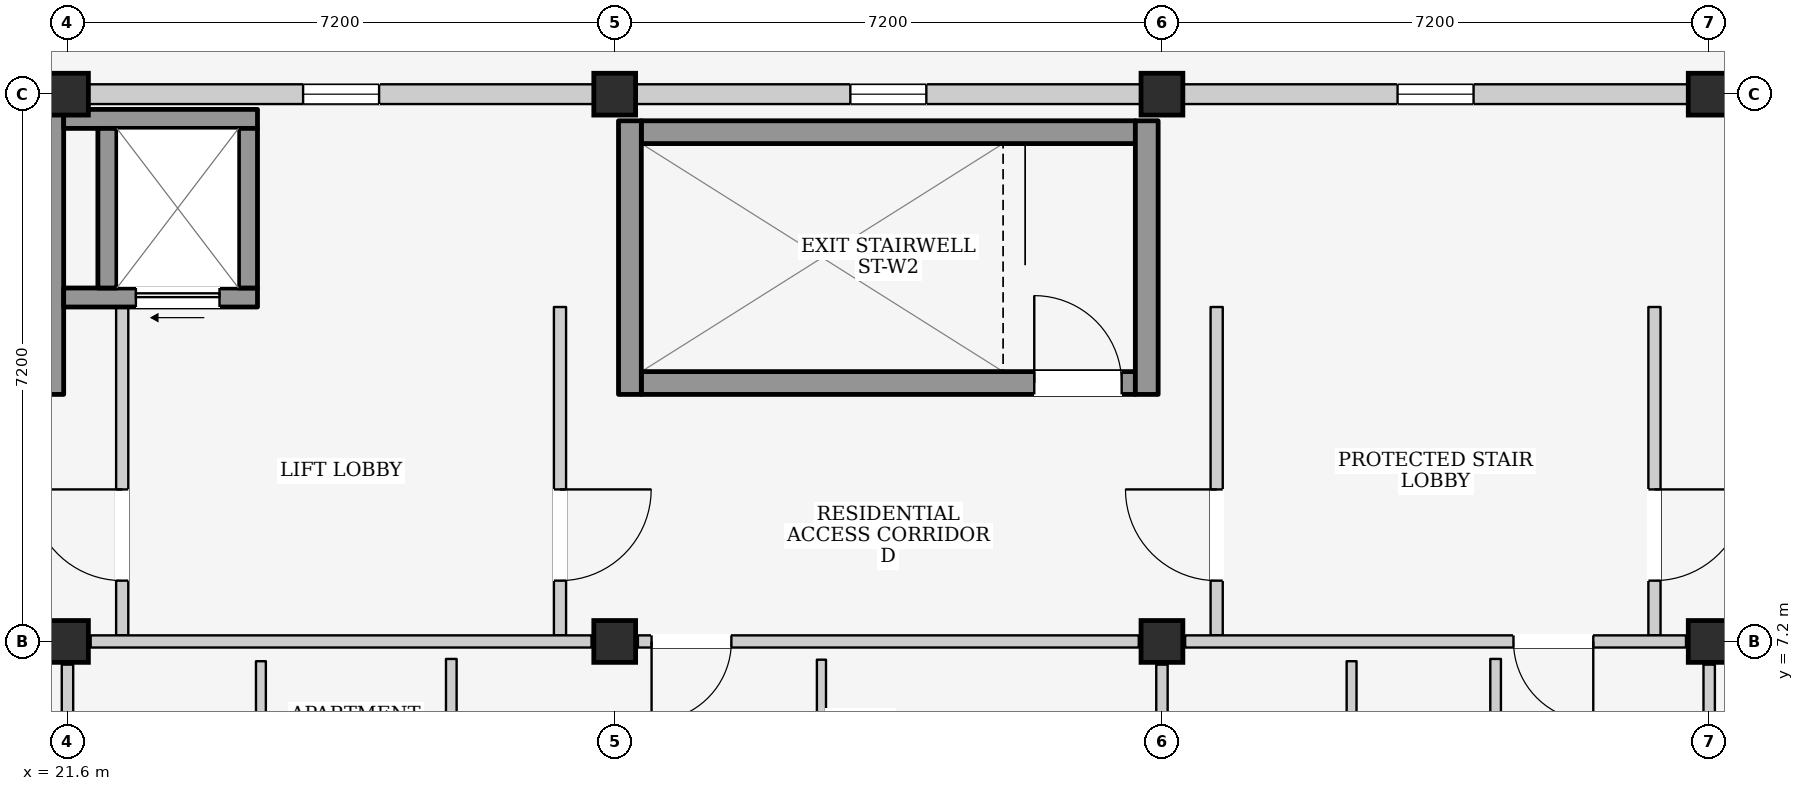
"""IFC4 building model, lengths in metres.
Left out: names, types, materials, properties, quantities, classifications, styles, units other than length and angle.
Written with IfcOpenShell. Run it as: python <this file> out.ifc"""

import sys

from ifc_helpers import new_model, si_unit, direction, frame, frame_2d, origin, origin_2d, place, context, subcontext, project, spatial, rectangle, extrude, element, fill, save


model = new_model("IFC4")
c1 = context("Model", 3, precision=1e-05, world=origin(), true_north=direction((0.0, 1.0)))
c2 = subcontext(c1, "Body", "Model", "MODEL_VIEW")
j1 = project(units=[si_unit("LENGTHUNIT", "METRE"), si_unit("PLANEANGLEUNIT", "RADIAN")], contexts=[c1])
p1 = place(None, origin())
s1 = spatial("IfcSite", under=j1, at=p1, CompositionType="ELEMENT")
p2 = place(p1, origin())
s2 = spatial("IfcBuilding", under=s1, at=p2, CompositionType="ELEMENT")
p3 = place(p2, frame((0.0, 0.0, 28.3)))
s3 = spatial("IfcBuildingStorey", under=s2, at=p3, CompositionType="ELEMENT", Elevation=28.3)
for number, where, z_axis, x_axis in (
    (1, (21.6, 7.2, 0.0), (0.0, 0.0, 1.0), (1.0, 0.0, 0.0)),
    (2, (21.6, 14.4, 0.0), (0.0, 0.0, 1.0), (1.0, 0.0, 0.0)),
    (3, (28.8, 7.2, 0.0), (0.0, 0.0, 1.0), (1.0, 0.0, 0.0)),
    (4, (28.8, 14.4, 0.0), (0.0, 0.0, 1.0), (1.0, 0.0, 0.0)),
    (5, (36.0, 7.2, 0.0), (0.0, 0.0, 1.0), (1.0, 0.0, 0.0)),
    (6, (36.0, 14.4, 0.0), (0.0, 0.0, 1.0), (1.0, 0.0, 0.0)),
    (7, (43.2, 7.2, 0.0), (0.0, 0.0, 1.0), (1.0, 0.0, 0.0)),
    (8, (43.2, 14.4, 0.0), (0.0, 0.0, 1.0), (1.0, 0.0, 0.0)),
):
    element("IfcColumn", number, at=place(p3, frame(where, z_axis=z_axis, x_axis=x_axis)), inside=s3, PredefinedType="COLUMN", context=c2, shape_type="SweptSolid", body=[
        extrude(rectangle(XDim=0.55, YDim=0.55, at=origin_2d()), origin(), (0.0, 0.0, 1.0), 3.2),
    ])
p4 = place(p3, frame((21.875, 14.4, 0.0), z_axis=(0.0, 0.0, 1.0), x_axis=(1.0, 0.0, 0.0)))
e9 = element("IfcWall", 9, at=p4, inside=s3, PredefinedType="ELEMENTEDWALL", context=c2, shape_type="SweptSolid", body=[
    extrude(rectangle(XDim=6.65, YDim=0.26, at=frame_2d((3.325, 0.0))), origin(), (0.0, 0.0, 1.0), 2.345),
])
p5 = place(p4, frame((2.825, 0.0, 1.2)))
e10 = element("IfcOpeningElement", 10, at=p5, cuts=e9, PredefinedType="OPENING", context=c2, shape_type="SweptSolid", body=[
    extrude(rectangle(XDim=1.0, YDim=0.9, at=frame_2d((0.5, 0.45))), frame((0.0, 0.145, 0.0), z_axis=(0.0, -1.0, 0.0), x_axis=(1.0, 0.0, 0.0)), (0.0, 0.0, 1.0), 0.29),
])
p6 = place(p3, frame((29.075, 14.4, 0.0), z_axis=(0.0, 0.0, 1.0), x_axis=(1.0, 0.0, 0.0)))
e11 = element("IfcWall", 11, at=p6, inside=s3, PredefinedType="ELEMENTEDWALL", context=c2, shape_type="SweptSolid", body=[
    extrude(rectangle(XDim=6.65, YDim=0.26, at=frame_2d((3.325, 0.0))), origin(), (0.0, 0.0, 1.0), 2.345),
])
p7 = place(p6, frame((2.825, 0.0, 1.2)))
e12 = element("IfcOpeningElement", 12, at=p7, cuts=e11, PredefinedType="OPENING", context=c2, shape_type="SweptSolid", body=[
    extrude(rectangle(XDim=1.0, YDim=0.9, at=frame_2d((0.5, 0.45))), frame((0.0, 0.145, 0.0), z_axis=(0.0, -1.0, 0.0), x_axis=(1.0, 0.0, 0.0)), (0.0, 0.0, 1.0), 0.29),
])
p8 = place(p3, frame((36.275, 14.4, 0.0), z_axis=(0.0, 0.0, 1.0), x_axis=(1.0, 0.0, 0.0)))
e13 = element("IfcWall", 13, at=p8, inside=s3, PredefinedType="ELEMENTEDWALL", context=c2, shape_type="SweptSolid", body=[
    extrude(rectangle(XDim=6.65, YDim=0.26, at=frame_2d((3.325, 0.0))), origin(), (0.0, 0.0, 1.0), 2.345),
])
p9 = place(p8, frame((2.825, 0.0, 1.2)))
e14 = element("IfcOpeningElement", 14, at=p9, cuts=e13, PredefinedType="OPENING", context=c2, shape_type="SweptSolid", body=[
    extrude(rectangle(XDim=1.0, YDim=0.9, at=frame_2d((0.5, 0.45))), frame((0.0, 0.145, 0.0), z_axis=(0.0, -1.0, 0.0), x_axis=(1.0, 0.0, 0.0)), (0.0, 0.0, 1.0), 0.29),
])
p10 = place(p3, frame((21.4, 10.45, 0.0), z_axis=(0.0, 0.0, 1.0), x_axis=(0.0, 1.0, 0.0)))
e15 = element("IfcWall", 15, at=p10, inside=s3, PredefinedType="SHEAR", context=c2, shape_type="SweptSolid", body=[
    extrude(rectangle(XDim=3.75, YDim=0.3, at=frame_2d((1.875, 0.0))), origin(), (0.0, 0.0, 1.0), 2.95),
])
p11 = place(p3, frame((22.32, 7.28, 0.0), z_axis=(0.0, 0.0, 1.0), x_axis=(0.0, 1.0, 0.0)))
e16 = element("IfcWall", 16, at=p11, inside=s3, PredefinedType="PARTITIONING", context=c2, shape_type="SweptSolid", body=[
    extrude(rectangle(XDim=4.32, YDim=0.16, at=frame_2d((2.16, 0.0))), origin(), (0.0, 0.0, 1.0), 2.95),
])
p12 = place(p11, frame((0.72, 0.0, 0.0)))
e17 = element("IfcOpeningElement", 17, at=p12, cuts=e16, PredefinedType="OPENING", context=c2, shape_type="SweptSolid", body=[
    extrude(rectangle(XDim=1.2, YDim=2.2, at=frame_2d((0.6, 1.1))), frame((0.0, 0.095, 0.0), z_axis=(0.0, -1.0, 0.0), x_axis=(1.0, 0.0, 0.0)), (0.0, 0.0, 1.0), 0.19),
])
p13 = place(p3, frame((28.08, 7.28, 0.0), z_axis=(0.0, 0.0, 1.0), x_axis=(0.0, 1.0, 0.0)))
e18 = element("IfcWall", 18, at=p13, inside=s3, PredefinedType="PARTITIONING", context=c2, shape_type="SweptSolid", body=[
    extrude(rectangle(XDim=4.32, YDim=0.16, at=frame_2d((2.16, 0.0))), origin(), (0.0, 0.0, 1.0), 2.95),
])
p14 = place(p13, frame((0.72, 0.0, 0.0)))
e19 = element("IfcOpeningElement", 19, at=p14, cuts=e18, PredefinedType="OPENING", context=c2, shape_type="SweptSolid", body=[
    extrude(rectangle(XDim=1.2, YDim=2.2, at=frame_2d((0.6, 1.1))), frame((0.0, 0.095, 0.0), z_axis=(0.0, -1.0, 0.0), x_axis=(1.0, 0.0, 0.0)), (0.0, 0.0, 1.0), 0.19),
])
p15 = place(p3, frame((21.55, 11.725, 0.0), z_axis=(0.0, 0.0, 1.0), x_axis=(1.0, 0.0, 0.0)))
e20 = element("IfcWall", 20, at=p15, inside=s3, PredefinedType="SHEAR", context=c2, shape_type="SweptSolid", body=[
    extrude(rectangle(XDim=2.55, YDim=0.25, at=frame_2d((1.275, 0.0))), origin(), (0.0, 0.0, 1.0), 2.95),
])
p16 = place(p15, frame((0.95, 0.0, 0.0)))
e21 = element("IfcOpeningElement", 21, at=p16, cuts=e20, PredefinedType="OPENING", context=c2, shape_type="SweptSolid", body=[
    extrude(rectangle(XDim=1.1, YDim=2.15, at=frame_2d((0.55, 1.075))), frame((0.0, 0.14, 0.0), z_axis=(0.0, -1.0, 0.0), x_axis=(1.0, 0.0, 0.0)), (0.0, 0.0, 1.0), 0.28),
])
p17 = place(p3, frame((21.55, 14.075, 0.0), z_axis=(0.0, 0.0, 1.0), x_axis=(1.0, 0.0, 0.0)))
e22 = element("IfcWall", 22, at=p17, inside=s3, PredefinedType="SHEAR", context=c2, shape_type="SweptSolid", body=[
    extrude(rectangle(XDim=2.55, YDim=0.25, at=frame_2d((1.275, 0.0))), origin(), (0.0, 0.0, 1.0), 2.95),
])
for number, where, z_axis, x_axis in (
    (23, (22.125, 11.85, 0.0), (0.0, 0.0, 1.0), (0.0, 1.0, 0.0)),
    (24, (23.975, 11.85, 0.0), (0.0, 0.0, 1.0), (0.0, 1.0, 0.0)),
):
    element("IfcWall", number, at=place(p3, frame(where, z_axis=z_axis, x_axis=x_axis)), inside=s3, PredefinedType="SHEAR", context=c2, shape_type="SweptSolid", body=[
        extrude(rectangle(XDim=2.1, YDim=0.25, at=frame_2d((1.05, 0.0))), origin(), (0.0, 0.0, 1.0), 2.95),
    ])
p18 = place(p3, frame((29.15, 10.6, 0.0), z_axis=(0.0, 0.0, 1.0), x_axis=(1.0, 0.0, 0.0)))
e25 = element("IfcWall", 25, at=p18, inside=s3, PredefinedType="SHEAR", context=c2, shape_type="SweptSolid", body=[
    extrude(rectangle(XDim=6.5, YDim=0.3, at=frame_2d((3.25, 0.0))), origin(), (0.0, 0.0, 1.0), 2.95),
])
p19 = place(p18, frame((5.17, 0.0, 0.0)))
e26 = element("IfcOpeningElement", 26, at=p19, cuts=e25, PredefinedType="OPENING", context=c2, shape_type="SweptSolid", body=[
    extrude(rectangle(XDim=1.15, YDim=2.2, at=frame_2d((0.575, 1.1))), frame((0.0, 0.165, 0.0), z_axis=(0.0, -1.0, 0.0), x_axis=(1.0, 0.0, 0.0)), (0.0, 0.0, 1.0), 0.33),
])
p20 = place(p3, frame((29.15, 13.9, 0.0), z_axis=(0.0, 0.0, 1.0), x_axis=(1.0, 0.0, 0.0)))
e27 = element("IfcWall", 27, at=p20, inside=s3, PredefinedType="SHEAR", context=c2, shape_type="SweptSolid", body=[
    extrude(rectangle(XDim=6.5, YDim=0.3, at=frame_2d((3.25, 0.0))), origin(), (0.0, 0.0, 1.0), 2.95),
])
for number, where, z_axis, x_axis in (
    (28, (29.0, 10.45, 0.0), (0.0, 0.0, 1.0), (0.0, 1.0, 0.0)),
    (29, (35.8, 10.45, 0.0), (0.0, 0.0, 1.0), (0.0, 1.0, 0.0)),
):
    element("IfcWall", number, at=place(p3, frame(where, z_axis=z_axis, x_axis=x_axis)), inside=s3, PredefinedType="SHEAR", context=c2, shape_type="SweptSolid", body=[
        extrude(rectangle(XDim=3.6, YDim=0.3, at=frame_2d((1.8, 0.0))), origin(), (0.0, 0.0, 1.0), 2.95),
    ])
p21 = place(p3, frame((36.72, 7.28, 0.0), z_axis=(0.0, 0.0, 1.0), x_axis=(0.0, 1.0, 0.0)))
e30 = element("IfcWall", 30, at=p21, inside=s3, PredefinedType="PARTITIONING", context=c2, shape_type="SweptSolid", body=[
    extrude(rectangle(XDim=4.32, YDim=0.16, at=frame_2d((2.16, 0.0))), origin(), (0.0, 0.0, 1.0), 2.95),
])
p22 = place(p21, frame((0.72, 0.0, 0.0)))
e31 = element("IfcOpeningElement", 31, at=p22, cuts=e30, PredefinedType="OPENING", context=c2, shape_type="SweptSolid", body=[
    extrude(rectangle(XDim=1.2, YDim=2.2, at=frame_2d((0.6, 1.1))), frame((0.0, 0.095, 0.0), z_axis=(0.0, -1.0, 0.0), x_axis=(1.0, 0.0, 0.0)), (0.0, 0.0, 1.0), 0.19),
])
p23 = place(p3, frame((42.48, 7.28, 0.0), z_axis=(0.0, 0.0, 1.0), x_axis=(0.0, 1.0, 0.0)))
e32 = element("IfcWall", 32, at=p23, inside=s3, PredefinedType="PARTITIONING", context=c2, shape_type="SweptSolid", body=[
    extrude(rectangle(XDim=4.32, YDim=0.16, at=frame_2d((2.16, 0.0))), origin(), (0.0, 0.0, 1.0), 2.95),
])
p24 = place(p23, frame((0.72, 0.0, 0.0)))
e33 = element("IfcOpeningElement", 33, at=p24, cuts=e32, PredefinedType="OPENING", context=c2, shape_type="SweptSolid", body=[
    extrude(rectangle(XDim=1.2, YDim=2.2, at=frame_2d((0.6, 1.1))), frame((0.0, 0.095, 0.0), z_axis=(0.0, -1.0, 0.0), x_axis=(1.0, 0.0, 0.0)), (0.0, 0.0, 1.0), 0.19),
])
p25 = place(p3, frame((21.6, 0.305, 0.0), z_axis=(0.0, 0.0, 1.0), x_axis=(0.0, 1.0, 0.0)))
e34 = element("IfcWall", 34, at=p25, inside=s3, PredefinedType="PARTITIONING", context=c2, shape_type="SweptSolid", body=[
    extrude(rectangle(XDim=6.59, YDim=0.15, at=frame_2d((3.295, 0.0))), origin(), (0.0, 0.0, 1.0), 2.445),
])
p26 = place(p3, frame((21.905, 7.2, 0.0), z_axis=(0.0, 0.0, 1.0), x_axis=(1.0, 0.0, 0.0)))
e35 = element("IfcWall", 35, at=p26, inside=s3, PredefinedType="PARTITIONING", context=c2, shape_type="SweptSolid", body=[
    extrude(rectangle(XDim=6.59, YDim=0.16, at=frame_2d((3.295, 0.0))), origin(), (0.0, 0.0, 1.0), 2.345),
])
p27 = place(p3, frame((29.105, 7.2, 0.0), z_axis=(0.0, 0.0, 1.0), x_axis=(1.0, 0.0, 0.0)))
e36 = element("IfcWall", 36, at=p27, inside=s3, PredefinedType="PARTITIONING", context=c2, shape_type="SweptSolid", body=[
    extrude(rectangle(XDim=6.59, YDim=0.16, at=frame_2d((3.295, 0.0))), origin(), (0.0, 0.0, 1.0), 2.345),
])
p28 = place(p27, frame((0.18, 0.0, 0.0)))
e37 = element("IfcOpeningElement", 37, at=p28, cuts=e36, PredefinedType="OPENING", context=c2, shape_type="SweptSolid", body=[
    extrude(rectangle(XDim=1.05, YDim=2.15, at=frame_2d((0.525, 1.075))), frame((0.0, 0.095, 0.0), z_axis=(0.0, -1.0, 0.0), x_axis=(1.0, 0.0, 0.0)), (0.0, 0.0, 1.0), 0.19),
])
p29 = place(p3, frame((36.0, 0.305, 0.0), z_axis=(0.0, 0.0, 1.0), x_axis=(0.0, 1.0, 0.0)))
e38 = element("IfcWall", 38, at=p29, inside=s3, PredefinedType="PARTITIONING", context=c2, shape_type="SweptSolid", body=[
    extrude(rectangle(XDim=6.59, YDim=0.15, at=frame_2d((3.295, 0.0))), origin(), (0.0, 0.0, 1.0), 2.445),
])
p30 = place(p3, frame((24.145, 3.9, 0.0), z_axis=(0.0, 0.0, 1.0), x_axis=(0.0, 1.0, 0.0)))
e39 = element("IfcWall", 39, at=p30, inside=s3, PredefinedType="PARTITIONING", context=c2, shape_type="SweptSolid", body=[
    extrude(rectangle(XDim=3.04, YDim=0.13, at=frame_2d((1.52, 0.0))), origin(), (0.0, 0.0, 1.0), 2.95),
])
p31 = place(p3, frame((26.65, 3.91, 0.0), z_axis=(0.0, 0.0, 1.0), x_axis=(0.0, 1.0, 0.0)))
e40 = element("IfcWall", 40, at=p31, inside=s3, PredefinedType="PARTITIONING", context=c2, shape_type="SweptSolid", body=[
    extrude(rectangle(XDim=3.06, YDim=0.14, at=frame_2d((1.53, 0.0))), origin(), (0.0, 0.0, 1.0), 2.95),
])
p32 = place(p3, frame((31.52, 3.92, 0.0), z_axis=(0.0, 0.0, 1.0), x_axis=(0.0, 1.0, 0.0)))
e41 = element("IfcWall", 41, at=p32, inside=s3, PredefinedType="PARTITIONING", context=c2, shape_type="SweptSolid", body=[
    extrude(rectangle(XDim=3.04, YDim=0.12, at=frame_2d((1.52, 0.0))), origin(), (0.0, 0.0, 1.0), 2.95),
])
p33 = place(p32, frame((1.04, 0.0, 0.0)))
e42 = element("IfcOpeningElement", 42, at=p33, cuts=e41, PredefinedType="OPENING", context=c2, shape_type="SweptSolid", body=[
    extrude(rectangle(XDim=0.96, YDim=2.15, at=frame_2d((0.48, 1.075))), frame((0.0, 0.075, 0.0), z_axis=(0.0, -1.0, 0.0), x_axis=(1.0, 0.0, 0.0)), (0.0, 0.0, 1.0), 0.15),
])
p34 = place(p3, frame((36.305, 7.2, 0.0), z_axis=(0.0, 0.0, 1.0), x_axis=(1.0, 0.0, 0.0)))
e43 = element("IfcWall", 43, at=p34, inside=s3, PredefinedType="PARTITIONING", context=c2, shape_type="SweptSolid", body=[
    extrude(rectangle(XDim=6.59, YDim=0.16, at=frame_2d((3.295, 0.0))), origin(), (0.0, 0.0, 1.0), 2.345),
])
p35 = place(p34, frame((4.32, 0.0, 0.0)))
e44 = element("IfcOpeningElement", 44, at=p35, cuts=e43, PredefinedType="OPENING", context=c2, shape_type="SweptSolid", body=[
    extrude(rectangle(XDim=1.05, YDim=2.15, at=frame_2d((0.525, 1.075))), frame((0.0, 0.095, 0.0), z_axis=(0.0, -1.0, 0.0), x_axis=(1.0, 0.0, 0.0)), (0.0, 0.0, 1.0), 0.19),
])
p36 = place(p3, frame((43.2, 0.305, 0.0), z_axis=(0.0, 0.0, 1.0), x_axis=(0.0, 1.0, 0.0)))
e45 = element("IfcWall", 45, at=p36, inside=s3, PredefinedType="PARTITIONING", context=c2, shape_type="SweptSolid", body=[
    extrude(rectangle(XDim=6.59, YDim=0.15, at=frame_2d((3.295, 0.0))), origin(), (0.0, 0.0, 1.0), 2.445),
])
p37 = place(p3, frame((38.495, 4.61, 0.0), z_axis=(0.0, 0.0, 1.0), x_axis=(0.0, 1.0, 0.0)))
e46 = element("IfcWall", 46, at=p37, inside=s3, PredefinedType="PARTITIONING", context=c2, shape_type="SweptSolid", body=[
    extrude(rectangle(XDim=2.33, YDim=0.13, at=frame_2d((1.165, 0.0))), origin(), (0.0, 0.0, 1.0), 2.95),
])
p38 = place(p3, frame((40.39, 4.62, 0.0), z_axis=(0.0, 0.0, 1.0), x_axis=(0.0, 1.0, 0.0)))
e47 = element("IfcWall", 47, at=p38, inside=s3, PredefinedType="PARTITIONING", context=c2, shape_type="SweptSolid", body=[
    extrude(rectangle(XDim=2.35, YDim=0.14, at=frame_2d((1.175, 0.0))), origin(), (0.0, 0.0, 1.0), 2.95),
])
p39 = place(p5, origin())
e48 = element("IfcWindow", 48, at=p39, inside=s3, PartitioningType="SINGLE_PANEL", PredefinedType="WINDOW", context=c2, shape_type="SweptSolid", body=[
    extrude(rectangle(XDim=1.0, YDim=0.9, at=frame_2d((0.5, 0.45))), frame((0.0, 0.03, 0.0), z_axis=(0.0, -1.0, 0.0), x_axis=(1.0, 0.0, 0.0)), (0.0, 0.0, 1.0), 0.06),
])
fill(e10, e48)
p40 = place(p7, origin())
e49 = element("IfcWindow", 49, at=p40, inside=s3, PartitioningType="SINGLE_PANEL", PredefinedType="WINDOW", context=c2, shape_type="SweptSolid", body=[
    extrude(rectangle(XDim=1.0, YDim=0.9, at=frame_2d((0.5, 0.45))), frame((0.0, 0.03, 0.0), z_axis=(0.0, -1.0, 0.0), x_axis=(1.0, 0.0, 0.0)), (0.0, 0.0, 1.0), 0.06),
])
fill(e12, e49)
p41 = place(p9, origin())
e50 = element("IfcWindow", 50, at=p41, inside=s3, PartitioningType="SINGLE_PANEL", PredefinedType="WINDOW", context=c2, shape_type="SweptSolid", body=[
    extrude(rectangle(XDim=1.0, YDim=0.9, at=frame_2d((0.5, 0.45))), frame((0.0, 0.03, 0.0), z_axis=(0.0, -1.0, 0.0), x_axis=(1.0, 0.0, 0.0)), (0.0, 0.0, 1.0), 0.06),
])
fill(e14, e50)
p42 = place(p12, origin())
e51 = element("IfcDoor", 51, at=p42, inside=s3, OperationType="SINGLE_SWING_RIGHT", PredefinedType="DOOR", context=c2, shape_type="SweptSolid", body=[
    extrude(rectangle(XDim=1.2, YDim=2.2, at=frame_2d((0.6, 1.1))), frame((0.0, 0.025, 0.0), z_axis=(0.0, -1.0, 0.0), x_axis=(1.0, 0.0, 0.0)), (0.0, 0.0, 1.0), 0.05),
])
fill(e17, e51)
p43 = place(p14, frame((1.2, 0.0, 0.0), z_axis=(0.0, 0.0, 1.0), x_axis=(-1.0, 0.0, 0.0)))
e52 = element("IfcDoor", 52, at=p43, inside=s3, OperationType="SINGLE_SWING_LEFT", PredefinedType="DOOR", context=c2, shape_type="SweptSolid", body=[
    extrude(rectangle(XDim=1.2, YDim=2.2, at=frame_2d((0.6, 1.1))), frame((0.0, 0.025, 0.0), z_axis=(0.0, -1.0, 0.0), x_axis=(1.0, 0.0, 0.0)), (0.0, 0.0, 1.0), 0.05),
])
fill(e19, e52)
p44 = place(p16, frame((1.1, 0.0, 0.0), z_axis=(0.0, 0.0, 1.0), x_axis=(-1.0, 0.0, 0.0)))
e53 = element("IfcDoor", 53, at=p44, inside=s3, OperationType="SLIDING_TO_LEFT", PredefinedType="DOOR", context=c2, shape_type="SweptSolid", body=[
    extrude(rectangle(XDim=1.1, YDim=2.15, at=frame_2d((0.55, 1.075))), frame((0.0, 0.025, 0.0), z_axis=(0.0, -1.0, 0.0), x_axis=(1.0, 0.0, 0.0)), (0.0, 0.0, 1.0), 0.05),
])
fill(e21, e53)
p45 = place(p19, origin())
e54 = element("IfcDoor", 54, at=p45, inside=s3, OperationType="SINGLE_SWING_LEFT", PredefinedType="DOOR", context=c2, shape_type="SweptSolid", body=[
    extrude(rectangle(XDim=1.15, YDim=2.2, at=frame_2d((0.575, 1.1))), frame((0.0, 0.025, 0.0), z_axis=(0.0, -1.0, 0.0), x_axis=(1.0, 0.0, 0.0)), (0.0, 0.0, 1.0), 0.05),
])
fill(e26, e54)
p46 = place(p22, origin())
e55 = element("IfcDoor", 55, at=p46, inside=s3, OperationType="SINGLE_SWING_RIGHT", PredefinedType="DOOR", context=c2, shape_type="SweptSolid", body=[
    extrude(rectangle(XDim=1.2, YDim=2.2, at=frame_2d((0.6, 1.1))), frame((0.0, 0.025, 0.0), z_axis=(0.0, -1.0, 0.0), x_axis=(1.0, 0.0, 0.0)), (0.0, 0.0, 1.0), 0.05),
])
fill(e31, e55)
p47 = place(p24, frame((1.2, 0.0, 0.0), z_axis=(0.0, 0.0, 1.0), x_axis=(-1.0, 0.0, 0.0)))
e56 = element("IfcDoor", 56, at=p47, inside=s3, OperationType="SINGLE_SWING_LEFT", PredefinedType="DOOR", context=c2, shape_type="SweptSolid", body=[
    extrude(rectangle(XDim=1.2, YDim=2.2, at=frame_2d((0.6, 1.1))), frame((0.0, 0.025, 0.0), z_axis=(0.0, -1.0, 0.0), x_axis=(1.0, 0.0, 0.0)), (0.0, 0.0, 1.0), 0.05),
])
fill(e33, e56)
p48 = place(p28, frame((1.05, 0.0, 0.0), z_axis=(0.0, 0.0, 1.0), x_axis=(-1.0, 0.0, 0.0)))
e57 = element("IfcDoor", 57, at=p48, inside=s3, OperationType="SINGLE_SWING_RIGHT", PredefinedType="DOOR", context=c2, shape_type="SweptSolid", body=[
    extrude(rectangle(XDim=1.05, YDim=2.15, at=frame_2d((0.525, 1.075))), frame((0.0, 0.025, 0.0), z_axis=(0.0, -1.0, 0.0), x_axis=(1.0, 0.0, 0.0)), (0.0, 0.0, 1.0), 0.05),
])
fill(e37, e57)
p49 = place(p35, frame((1.05, 0.0, 0.0), z_axis=(0.0, 0.0, 1.0), x_axis=(-1.0, 0.0, 0.0)))
e58 = element("IfcDoor", 58, at=p49, inside=s3, OperationType="SINGLE_SWING_LEFT", PredefinedType="DOOR", context=c2, shape_type="SweptSolid", body=[
    extrude(rectangle(XDim=1.05, YDim=2.15, at=frame_2d((0.525, 1.075))), frame((0.0, 0.025, 0.0), z_axis=(0.0, -1.0, 0.0), x_axis=(1.0, 0.0, 0.0)), (0.0, 0.0, 1.0), 0.05),
])
fill(e44, e58)
save(model, sys.argv[1])
